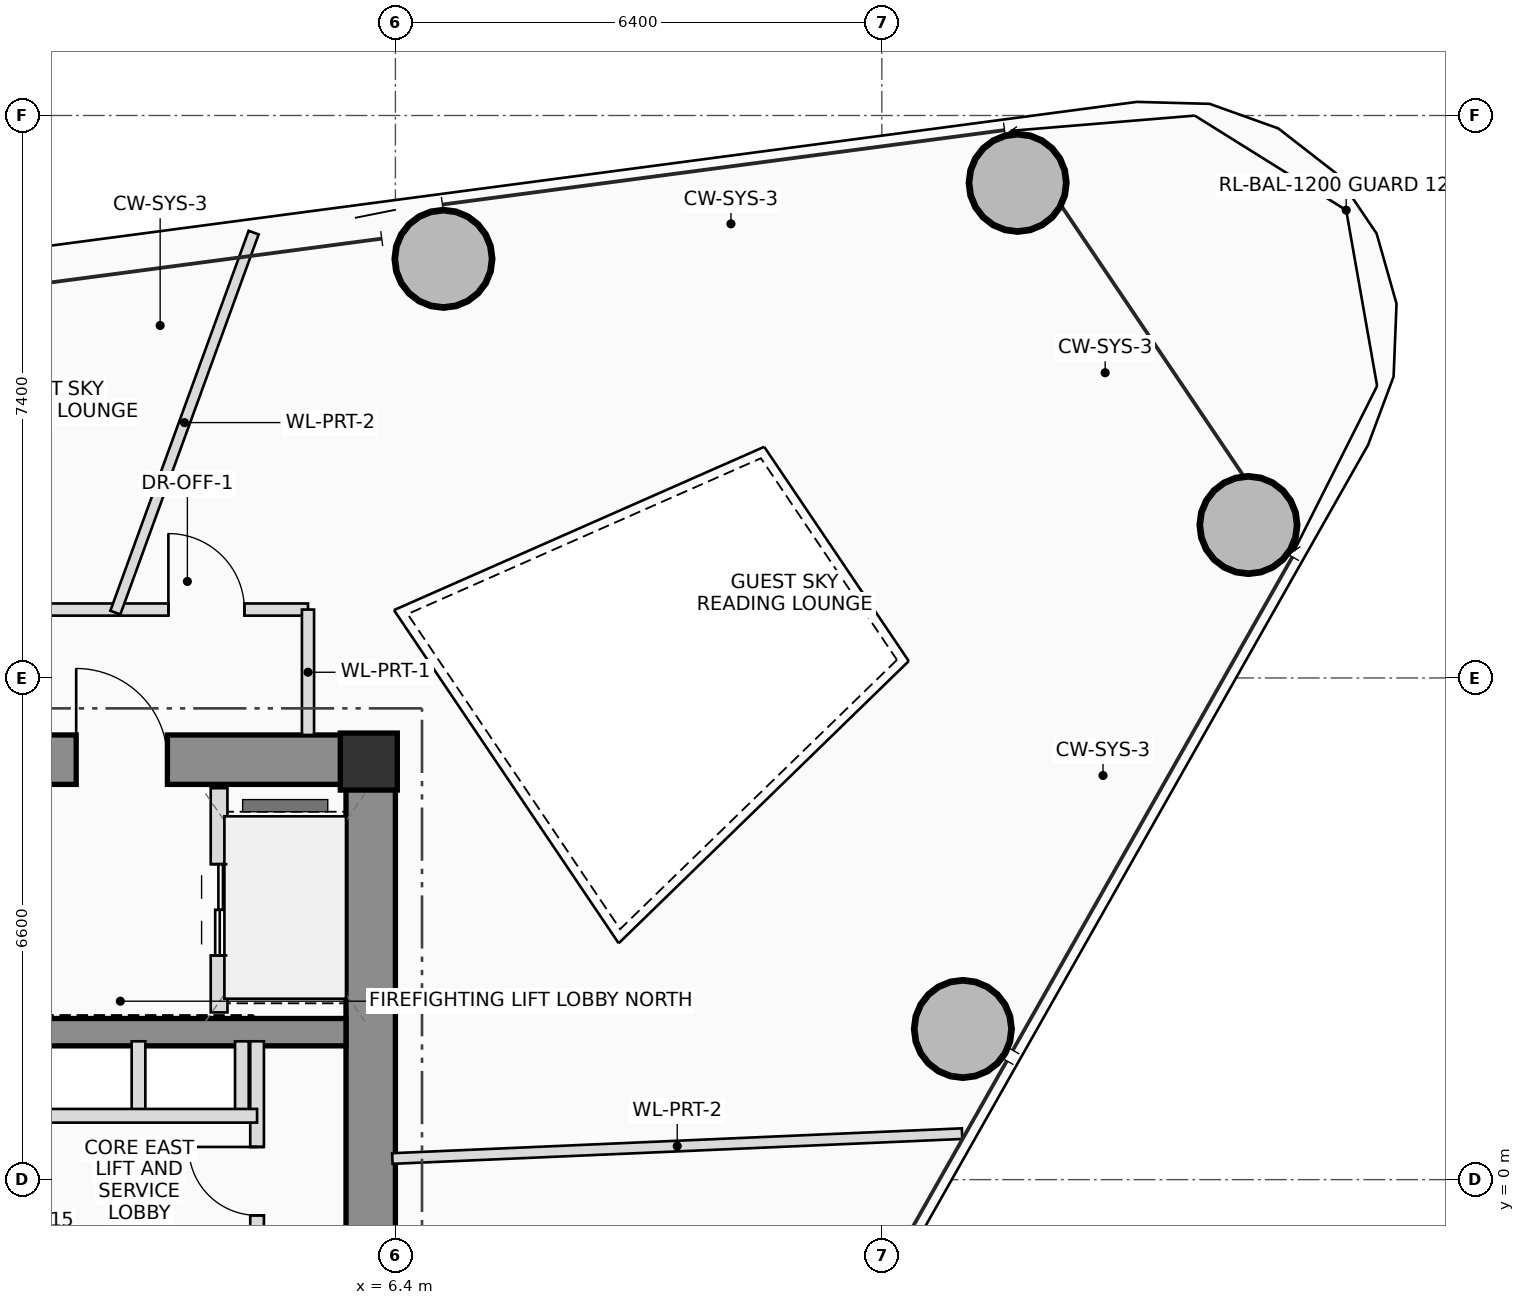
"""IFC4 building model, lengths in metres.
Left out: names, types, materials, properties, quantities, classifications, styles, units other than length and angle.
Written with IfcOpenShell. Run it as: python <this file> out.ifc"""

import sys

from ifc_helpers import new_model, si_unit, direction, frame, frame_2d, origin, origin_2d, place, context, subcontext, project, spatial, rectangle, hollow_circle, extrude, source, transform, mapped, element, fill, save


model = new_model("IFC4")
c1 = context("Model", 3, precision=1e-05, world=origin(), true_north=direction((0.0, 1.0)))
c2 = subcontext(c1, "Body", "Model", "MODEL_VIEW")
j1 = project(units=[si_unit("LENGTHUNIT", "METRE"), si_unit("PLANEANGLEUNIT", "RADIAN")], contexts=[c1])
p1 = place(None, origin())
s1 = spatial("IfcSite", under=j1, at=p1, CompositionType="ELEMENT")
p2 = place(p1, origin())
s2 = spatial("IfcBuilding", under=s1, at=p2, CompositionType="ELEMENT")
p3 = place(p2, frame((0.0, 0.0, 162.2)))
s3 = spatial("IfcBuildingStorey", under=s2, at=p3, CompositionType="ELEMENT", Elevation=162.2)
m1 = source(origin(), c2, "Body", "SweptSolid", [
    extrude(rectangle(XDim=0.75, YDim=0.75, at=origin_2d()), origin(), (0.0, 0.0, 1.0), 3.45),
])
p4 = place(p3, frame((6.05, 5.5, 0.0), z_axis=(0.0, 0.0, 1.0), x_axis=(1.0, 0.0, 0.0)))
e1 = element("IfcColumn", 1, at=p4, inside=s3, PredefinedType="COLUMN", context=c2, shape_type="MappedRepresentation", body=[
    mapped(m1, transform((0.0, 0.0, 0.0), scale=1.0)),
])
p5 = place(p3, frame((-6.4, 5.525, 0.0), z_axis=(0.0, 0.0, 1.0), x_axis=(1.0, 0.0, 0.0)))
e2 = element("IfcWall", 2, at=p5, inside=s3, PredefinedType="SHEAR", context=c2, shape_type="SweptSolid", body=[
    extrude(rectangle(XDim=12.8, YDim=0.65, at=frame_2d((6.4, 0.0))), origin(), (0.0, 0.0, 1.0), 3.45),
])
p6 = place(p5, frame((8.6, 0.0, 0.0)))
e3 = element("IfcOpeningElement", 3, at=p6, cuts=e2, PredefinedType="OPENING", context=c2, shape_type="SweptSolid", body=[
    extrude(rectangle(XDim=1.2, YDim=2.2, at=frame_2d((0.6, 1.1))), frame((0.0, 0.335, 0.0), z_axis=(0.0, -1.0, 0.0), x_axis=(1.0, 0.0, 0.0)), (0.0, 0.0, 1.0), 0.67),
])
p7 = place(p3, frame((6.075, -5.2, 0.0), z_axis=(0.0, 0.0, 1.0), x_axis=(0.0, 1.0, 0.0)))
e4 = element("IfcWall", 4, at=p7, inside=s3, PredefinedType="SHEAR", context=c2, shape_type="SweptSolid", body=[
    extrude(rectangle(XDim=10.4, YDim=0.65, at=frame_2d((5.2, 0.0))), origin(), (0.0, 0.0, 1.0), 3.45),
])
p8 = place(p3, frame((-5.75, 1.94, 0.0), z_axis=(0.0, 0.0, 1.0), x_axis=(1.0, 0.0, 0.0)))
e5 = element("IfcWall", 5, at=p8, inside=s3, PredefinedType="SHEAR", context=c2, shape_type="SweptSolid", body=[
    extrude(rectangle(XDim=11.5, YDim=0.36, at=frame_2d((5.75, 0.0))), origin(), (0.0, 0.0, 1.0), 3.45),
])
m2 = source(origin(), c2, "Body", "SweptSolid", [
    extrude(hollow_circle(Radius=0.65, WallThickness=0.045, at=origin_2d()), origin(), (0.0, 0.0, 1.0), 3.45),
])
for number, where, z_axis, x_axis in (
    (6, (13.866, 1.982, 0.0), (0.0, 0.0, 1.0), (1.0, 0.0, 0.0)),
    (7, (17.624, 8.612, 0.0), (0.0, 0.0, 1.0), (1.0, 0.0, 0.0)),
    (8, (14.587, 13.114, 0.0), (0.0, 0.0, 1.0), (1.0, 0.0, 0.0)),
    (9, (7.032, 12.114, 0.0), (0.0, 0.0, 1.0), (1.0, 0.0, 0.0)),
):
    element("IfcColumn", number, at=place(p3, frame(where, z_axis=z_axis, x_axis=x_axis)), inside=s3, PredefinedType="COLUMN", context=c2, shape_type="MappedRepresentation", body=[
        mapped(m2, transform((0.0, 0.0, 0.0), scale=1.0)),
    ])
p9 = place(p3, frame((4.08, 2.2, 0.0), z_axis=(0.0, 0.0, 1.0), x_axis=(0.0, 1.0, 0.0)))
e10 = element("IfcWall", 10, at=p9, inside=s3, PredefinedType="PLUMBINGWALL", context=c2, shape_type="SweptSolid", body=[
    extrude(rectangle(XDim=2.95, YDim=0.22, at=frame_2d((1.475, 0.0))), origin(), (0.0, 0.0, 1.0), 3.25),
])
p10 = place(p9, frame((0.75, 0.0, 0.0)))
e11 = element("IfcOpeningElement", 11, at=p10, cuts=e10, PredefinedType="OPENING", context=c2, shape_type="SweptSolid", body=[
    extrude(rectangle(XDim=1.2, YDim=2.25, at=frame_2d((0.6, 1.125))), frame((0.0, 0.12, 0.0), z_axis=(0.0, -1.0, 0.0), x_axis=(1.0, 0.0, 0.0)), (0.0, 0.0, 1.0), 0.24),
])
for number, where, z_axis, x_axis in (
    (12, (3.02, 0.84, 0.0), (0.0, 0.0, 1.0), (0.0, 1.0, 0.0)),
    (13, (4.38, 0.84, 0.0), (0.0, 0.0, 1.0), (0.0, 1.0, 0.0)),
):
    element("IfcWall", number, at=place(p3, frame(where, z_axis=z_axis, x_axis=x_axis)), inside=s3, PredefinedType="PLUMBINGWALL", context=c2, shape_type="SweptSolid", body=[
        extrude(rectangle(XDim=0.98, YDim=0.18, at=frame_2d((0.49, 0.0))), origin(), (0.0, 0.0, 1.0), 3.25),
    ])
p11 = place(p3, frame((4.58, -1.82, 0.0), z_axis=(0.0, 0.0, 1.0), x_axis=(0.0, 1.0, 0.0)))
e14 = element("IfcWall", 14, at=p11, inside=s3, PredefinedType="PLUMBINGWALL", context=c2, shape_type="SweptSolid", body=[
    extrude(rectangle(XDim=3.64, YDim=0.18, at=frame_2d((1.82, 0.0))), origin(), (0.0, 0.0, 1.0), 3.25),
])
p12 = place(p11, frame((1.35, 0.0, 0.0)))
e15 = element("IfcOpeningElement", 15, at=p12, cuts=e14, PredefinedType="OPENING", context=c2, shape_type="SweptSolid", body=[
    extrude(rectangle(XDim=0.9, YDim=2.05, at=frame_2d((0.45, 1.025))), frame((0.0, 0.1, 0.0), z_axis=(0.0, -1.0, 0.0), x_axis=(1.0, 0.0, 0.0)), (0.0, 0.0, 1.0), 0.2),
])
p13 = place(p3, frame((-5.68, 0.84, 0.0), z_axis=(0.0, 0.0, 1.0), x_axis=(1.0, 0.0, 0.0)))
e16 = element("IfcWall", 16, at=p13, inside=s3, PredefinedType="PLUMBINGWALL", context=c2, shape_type="SweptSolid", body=[
    extrude(rectangle(XDim=10.26, YDim=0.18, at=frame_2d((5.13, 0.0))), origin(), (0.0, 0.0, 1.0), 3.25),
])
p14 = place(p13, frame((1.08, 0.0, 0.0)))
e17 = element("IfcOpeningElement", 17, at=p14, cuts=e16, PredefinedType="OPENING", context=c2, shape_type="SweptSolid", body=[
    extrude(rectangle(XDim=0.9, YDim=2.05, at=frame_2d((0.45, 1.025))), frame((0.0, 0.1, 0.0), z_axis=(0.0, -1.0, 0.0), x_axis=(1.0, 0.0, 0.0)), (0.0, 0.0, 1.0), 0.2),
])
p15 = place(p13, frame((3.93, 0.0, 0.0)))
e18 = element("IfcOpeningElement", 18, at=p15, cuts=e16, PredefinedType="OPENING", context=c2, shape_type="SweptSolid", body=[
    extrude(rectangle(XDim=1.1, YDim=2.2, at=frame_2d((0.55, 1.1))), frame((0.0, 0.1, 0.0), z_axis=(0.0, -1.0, 0.0), x_axis=(1.0, 0.0, 0.0)), (0.0, 0.0, 1.0), 0.2),
])
p16 = place(p13, frame((5.63, 0.0, 0.0)))
e19 = element("IfcOpeningElement", 19, at=p16, cuts=e16, PredefinedType="OPENING", context=c2, shape_type="SweptSolid", body=[
    extrude(rectangle(XDim=1.1, YDim=2.2, at=frame_2d((0.55, 1.1))), frame((0.0, 0.1, 0.0), z_axis=(0.0, -1.0, 0.0), x_axis=(1.0, 0.0, 0.0)), (0.0, 0.0, 1.0), 0.2),
])
p17 = place(p3, frame((-6.36, 7.5, 0.0), z_axis=(0.0, 0.0, 1.0), x_axis=(1.0, 0.0, 0.0)))
e20 = element("IfcWall", 20, at=p17, inside=s3, PredefinedType="PARTITIONING", context=c2, shape_type="SweptSolid", body=[
    extrude(rectangle(XDim=11.61, YDim=0.16, at=frame_2d((5.805, 0.0))), origin(), (0.0, 0.0, 1.0), 2.605),
])
p18 = place(p17, frame((1.6, 0.0, 0.0)))
e21 = element("IfcOpeningElement", 21, at=p18, cuts=e20, PredefinedType="OPENING", context=c2, shape_type="SweptSolid", body=[
    extrude(rectangle(XDim=1.0, YDim=2.25, at=frame_2d((0.5, 1.125))), frame((0.0, 0.09, 0.0), z_axis=(0.0, -1.0, 0.0), x_axis=(1.0, 0.0, 0.0)), (0.0, 0.0, 1.0), 0.18),
])
p19 = place(p17, frame((6.631, 0.0, 0.0)))
e22 = element("IfcOpeningElement", 22, at=p19, cuts=e20, PredefinedType="OPENING", context=c2, shape_type="SweptSolid", body=[
    extrude(rectangle(XDim=1.0, YDim=2.25, at=frame_2d((0.5, 1.125))), frame((0.0, 0.09, 0.0), z_axis=(0.0, -1.0, 0.0), x_axis=(1.0, 0.0, 0.0)), (0.0, 0.0, 1.0), 0.18),
])
p20 = place(p17, frame((9.773, 0.0, 0.0)))
e23 = element("IfcOpeningElement", 23, at=p20, cuts=e20, PredefinedType="OPENING", context=c2, shape_type="SweptSolid", body=[
    extrude(rectangle(XDim=1.0, YDim=2.25, at=frame_2d((0.5, 1.125))), frame((0.0, 0.09, 0.0), z_axis=(0.0, -1.0, 0.0), x_axis=(1.0, 0.0, 0.0)), (0.0, 0.0, 1.0), 0.18),
])
p21 = place(p3, frame((5.25, 7.5, 0.0), z_axis=(0.0, 0.0, 1.0), x_axis=(0.0, -1.0, 0.0)))
e24 = element("IfcWall", 24, at=p21, inside=s3, PredefinedType="PARTITIONING", context=c2, shape_type="SweptSolid", body=[
    extrude(rectangle(XDim=1.65, YDim=0.16, at=frame_2d((0.825, 0.0))), origin(), (0.0, 0.0, 1.0), 3.25),
])
p22 = place(p3, frame((6.36, 0.278, 0.0), z_axis=(0.0, 0.0, 1.0), x_axis=(0.999047543566, 0.043634913719, 0.0)))
e25 = element("IfcWall", 25, at=p22, inside=s3, PredefinedType="PARTITIONING", context=c2, shape_type="SweptSolid", body=[
    extrude(rectangle(XDim=7.503, YDim=0.14, at=frame_2d((3.751, 0.0))), origin(), (0.0, 0.0, 1.0), 2.605),
])
p23 = place(p3, frame((2.715, 7.46, 0.0), z_axis=(0.0, 0.0, 1.0), x_axis=(0.342045165819, 0.939683512966, 0.0)))
e26 = element("IfcWall", 26, at=p23, inside=s3, PredefinedType="PARTITIONING", context=c2, shape_type="SweptSolid", body=[
    extrude(rectangle(XDim=5.32, YDim=0.14, at=frame_2d((2.66, 0.0))), origin(), (0.0, 0.0, 1.0), 2.605),
])
p24 = place(p6, origin())
e27 = element("IfcDoor", 27, at=p24, inside=s3, OperationType="SINGLE_SWING_LEFT", PredefinedType="DOOR", context=c2, shape_type="SweptSolid", body=[
    extrude(rectangle(XDim=1.2, YDim=2.2, at=frame_2d((0.6, 1.1))), frame((0.0, 0.025, 0.0), z_axis=(0.0, -1.0, 0.0), x_axis=(1.0, 0.0, 0.0)), (0.0, 0.0, 1.0), 0.05),
])
fill(e3, e27)
p25 = place(p10, origin())
e28 = element("IfcDoor", 28, at=p25, inside=s3, OperationType="DOUBLE_DOOR_SLIDING", PredefinedType="DOOR", context=c2, shape_type="SweptSolid", body=[
    extrude(rectangle(XDim=1.2, YDim=2.25, at=frame_2d((0.6, 1.125))), frame((0.0, 0.025, 0.0), z_axis=(0.0, -1.0, 0.0), x_axis=(1.0, 0.0, 0.0)), (0.0, 0.0, 1.0), 0.05),
])
fill(e11, e28)
p26 = place(p12, origin())
e29 = element("IfcDoor", 29, at=p26, inside=s3, OperationType="SINGLE_SWING_RIGHT", PredefinedType="DOOR", context=c2, shape_type="SweptSolid", body=[
    extrude(rectangle(XDim=0.9, YDim=2.05, at=frame_2d((0.45, 1.025))), frame((0.0, 0.025, 0.0), z_axis=(0.0, -1.0, 0.0), x_axis=(1.0, 0.0, 0.0)), (0.0, 0.0, 1.0), 0.05),
])
fill(e15, e29)
p27 = place(p20, origin())
e30 = element("IfcDoor", 30, at=p27, inside=s3, OperationType="SINGLE_SWING_LEFT", PredefinedType="DOOR", context=c2, shape_type="SweptSolid", body=[
    extrude(rectangle(XDim=1.0, YDim=2.25, at=frame_2d((0.5, 1.125))), frame((0.0, 0.025, 0.0), z_axis=(0.0, -1.0, 0.0), x_axis=(1.0, 0.0, 0.0)), (0.0, 0.0, 1.0), 0.05),
])
fill(e23, e30)
save(model, sys.argv[1])
